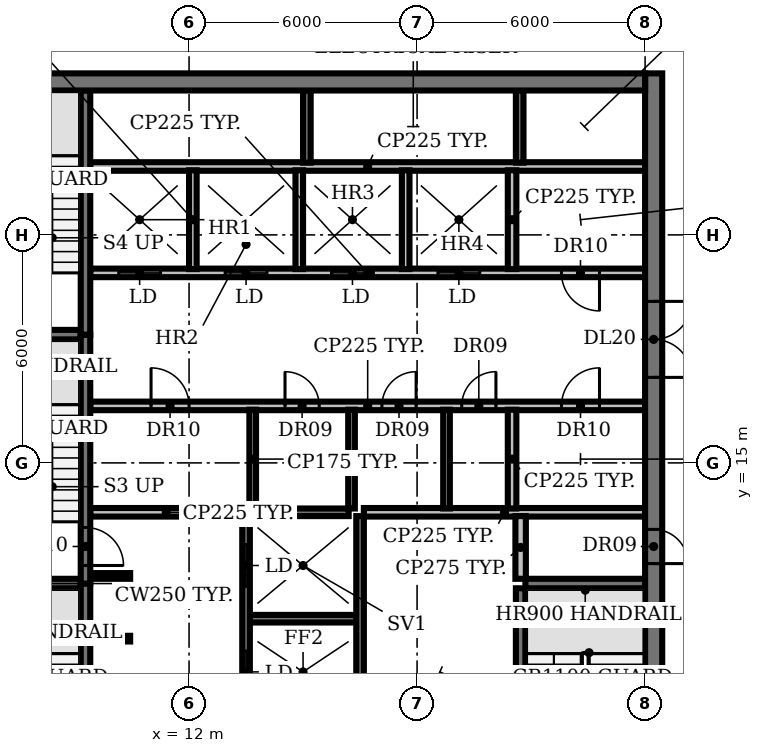
"""IFC4 building model, lengths in metres.
Left out: names, types, materials, properties, quantities, classifications, styles, units other than length and angle.
Written with IfcOpenShell. Run it as: python <this file> out.ifc"""

import sys

from ifc_helpers import new_model, si_unit, direction, frame, frame_2d, origin, place, context, subcontext, project, spatial, rectangle, extrude, element, fill, save


model = new_model("IFC4")
c1 = context("Model", 3, precision=1e-05, world=origin(), true_north=direction((0.0, 1.0)))
c2 = subcontext(c1, "Body", "Model", "MODEL_VIEW")
j1 = project(units=[si_unit("LENGTHUNIT", "METRE"), si_unit("PLANEANGLEUNIT", "RADIAN")], contexts=[c1])
p1 = place(None, origin())
s1 = spatial("IfcSite", under=j1, at=p1, CompositionType="ELEMENT")
p2 = place(p1, origin())
s2 = spatial("IfcBuilding", under=s1, at=p2, CompositionType="ELEMENT")
p3 = place(p2, frame((0.0, 0.0, 234.8)))
s3 = spatial("IfcBuildingStorey", under=s2, at=p3, CompositionType="ELEMENT", Elevation=234.8)
p4 = place(p3, frame((9.4, 10.375, 0.0), z_axis=(0.0, 0.0, 1.0), x_axis=(1.0, 0.0, 0.0)))
e1 = element("IfcWall", 1, at=p4, inside=s3, PredefinedType="SHEAR", context=c2, shape_type="SweptSolid", body=[
    extrude(rectangle(XDim=1.05, YDim=0.15, at=frame_2d((0.525, 0.0))), origin(), (0.0, 0.0, 1.0), 3.85),
])
p5 = place(p3, frame((13.6, 10.9, 0.0), z_axis=(0.0, 0.0, 1.0), x_axis=(1.0, 0.0, 0.0)))
e2 = element("IfcWall", 2, at=p5, inside=s3, PredefinedType="SHEAR", context=c2, shape_type="SweptSolid", body=[
    extrude(rectangle(XDim=2.8, YDim=0.2, at=frame_2d((1.4, 0.0))), origin(), (0.0, 0.0, 1.0), 3.85),
])
for number, where, z_axis, x_axis in (
    (3, (6.0, 11.825, 0.0), (0.0, 0.0, 1.0), (1.0, 0.0, 0.0)),
    (4, (20.85, 11.825, 0.0), (0.0, 0.0, 1.0), (1.0, 0.0, 0.0)),
):
    element("IfcWall", number, at=place(p3, frame(where, z_axis=z_axis, x_axis=x_axis)), inside=s3, PredefinedType="SHEAR", context=c2, shape_type="SweptSolid", body=[
        extrude(rectangle(XDim=3.15, YDim=0.25, at=frame_2d((1.575, 0.0))), origin(), (0.0, 0.0, 1.0), 3.85),
    ])
p6 = place(p3, frame((9.4, 12.025, 0.0), z_axis=(0.0, 0.0, 1.0), x_axis=(1.0, 0.0, 0.0)))
e5 = element("IfcWall", 5, at=p6, inside=s3, PredefinedType="SHEAR", context=c2, shape_type="SweptSolid", body=[
    extrude(rectangle(XDim=1.05, YDim=0.15, at=frame_2d((0.525, 0.0))), origin(), (0.0, 0.0, 1.0), 3.85),
])
p7 = place(p3, frame((9.4, 13.7, 0.0), z_axis=(0.0, 0.0, 1.0), x_axis=(1.0, 0.0, 0.0)))
e6 = element("IfcWall", 6, at=p7, inside=s3, PredefinedType="PARTITIONING", context=c2, shape_type="SweptSolid", body=[
    extrude(rectangle(XDim=4.0, YDim=0.225, at=frame_2d((2.0, 0.0))), origin(), (0.0, 0.0, 1.0), 3.85),
])
p8 = place(p3, frame((13.75, 13.7, 0.0), z_axis=(0.0, 0.0, 1.0), x_axis=(1.0, 0.0, 0.0)))
e7 = element("IfcWall", 7, at=p8, inside=s3, PredefinedType="SHEAR", context=c2, shape_type="SweptSolid", body=[
    extrude(rectangle(XDim=2.45, YDim=0.2, at=frame_2d((1.225, 0.0))), origin(), (0.0, 0.0, 1.0), 3.85),
])
p9 = place(p3, frame((16.6, 13.7, 0.0), z_axis=(0.0, 0.0, 1.0), x_axis=(1.0, 0.0, 0.0)))
e8 = element("IfcWall", 8, at=p9, inside=s3, PredefinedType="PARTITIONING", context=c2, shape_type="SweptSolid", body=[
    extrude(rectangle(XDim=7.4, YDim=0.225, at=frame_2d((3.7, 0.0))), origin(), (0.0, 0.0, 1.0), 3.85),
])
p10 = place(p3, frame((9.4, 16.5, 0.0), z_axis=(0.0, 0.0, 1.0), x_axis=(1.0, 0.0, 0.0)))
e9 = element("IfcWall", 9, at=p10, inside=s3, PredefinedType="PARTITIONING", context=c2, shape_type="SweptSolid", body=[
    extrude(rectangle(XDim=14.6, YDim=0.225, at=frame_2d((7.3, 0.0))), origin(), (0.0, 0.0, 1.0), 3.85),
])
p11 = place(p10, frame((1.6, 0.0, 0.0)))
e10 = element("IfcOpeningElement", 10, at=p11, cuts=e9, PredefinedType="OPENING", context=c2, shape_type="SweptSolid", body=[
    extrude(rectangle(XDim=1.0, YDim=2.1, at=frame_2d((0.5, 1.05))), frame((0.0, 0.123, 0.0), z_axis=(0.0, -1.0, 0.0), x_axis=(1.0, 0.0, 0.0)), (0.0, 0.0, 1.0), 0.245),
])
p12 = place(p10, frame((5.125, 0.0, 0.0)))
e11 = element("IfcOpeningElement", 11, at=p12, cuts=e9, PredefinedType="OPENING", context=c2, shape_type="SweptSolid", body=[
    extrude(rectangle(XDim=0.9, YDim=2.1, at=frame_2d((0.45, 1.05))), frame((0.0, 0.123, 0.0), z_axis=(0.0, -1.0, 0.0), x_axis=(1.0, 0.0, 0.0)), (0.0, 0.0, 1.0), 0.245),
])
p13 = place(p10, frame((7.675, 0.0, 0.0)))
e12 = element("IfcOpeningElement", 12, at=p13, cuts=e9, PredefinedType="OPENING", context=c2, shape_type="SweptSolid", body=[
    extrude(rectangle(XDim=0.9, YDim=2.1, at=frame_2d((0.45, 1.05))), frame((0.0, 0.123, 0.0), z_axis=(0.0, -1.0, 0.0), x_axis=(1.0, 0.0, 0.0)), (0.0, 0.0, 1.0), 0.245),
])
p14 = place(p10, frame((9.775, 0.0, 0.0)))
e13 = element("IfcOpeningElement", 13, at=p14, cuts=e9, PredefinedType="OPENING", context=c2, shape_type="SweptSolid", body=[
    extrude(rectangle(XDim=0.9, YDim=2.1, at=frame_2d((0.45, 1.05))), frame((0.0, 0.123, 0.0), z_axis=(0.0, -1.0, 0.0), x_axis=(1.0, 0.0, 0.0)), (0.0, 0.0, 1.0), 0.245),
])
p15 = place(p10, frame((12.4, 0.0, 0.0)))
e14 = element("IfcOpeningElement", 14, at=p15, cuts=e9, PredefinedType="OPENING", context=c2, shape_type="SweptSolid", body=[
    extrude(rectangle(XDim=1.0, YDim=2.1, at=frame_2d((0.5, 1.05))), frame((0.0, 0.123, 0.0), z_axis=(0.0, -1.0, 0.0), x_axis=(1.0, 0.0, 0.0)), (0.0, 0.0, 1.0), 0.245),
])
p16 = place(p3, frame((6.0, 18.375, 0.0), z_axis=(0.0, 0.0, 1.0), x_axis=(1.0, 0.0, 0.0)))
e15 = element("IfcWall", 15, at=p16, inside=s3, PredefinedType="SHEAR", context=c2, shape_type="SweptSolid", body=[
    extrude(rectangle(XDim=3.15, YDim=0.25, at=frame_2d((1.575, 0.0))), origin(), (0.0, 0.0, 1.0), 3.85),
])
p17 = place(p3, frame((24.0, 20.0, 0.0), z_axis=(0.0, 0.0, 1.0), x_axis=(-1.0, 0.0, 0.0)))
e16 = element("IfcWall", 16, at=p17, inside=s3, PredefinedType="PARTITIONING", context=c2, shape_type="SweptSolid", body=[
    extrude(rectangle(XDim=14.6, YDim=0.225, at=frame_2d((7.3, 0.0))), origin(), (0.0, 0.0, 1.0), 3.85),
])
p18 = place(p17, frame((12.75, 0.0, 0.0)))
e17 = element("IfcOpeningElement", 17, at=p18, cuts=e16, PredefinedType="OPENING", context=c2, shape_type="SweptSolid", body=[
    extrude(rectangle(XDim=1.1, YDim=2.1, at=frame_2d((0.55, 1.05))), frame((0.0, 0.123, 0.0), z_axis=(0.0, -1.0, 0.0), x_axis=(1.0, 0.0, 0.0)), (0.0, 0.0, 1.0), 0.245),
])
p19 = place(p17, frame((9.95, 0.0, 0.0)))
e18 = element("IfcOpeningElement", 18, at=p19, cuts=e16, PredefinedType="OPENING", context=c2, shape_type="SweptSolid", body=[
    extrude(rectangle(XDim=1.1, YDim=2.1, at=frame_2d((0.55, 1.05))), frame((0.0, 0.123, 0.0), z_axis=(0.0, -1.0, 0.0), x_axis=(1.0, 0.0, 0.0)), (0.0, 0.0, 1.0), 0.245),
])
p20 = place(p17, frame((7.15, 0.0, 0.0)))
e19 = element("IfcOpeningElement", 19, at=p20, cuts=e16, PredefinedType="OPENING", context=c2, shape_type="SweptSolid", body=[
    extrude(rectangle(XDim=1.1, YDim=2.1, at=frame_2d((0.55, 1.05))), frame((0.0, 0.123, 0.0), z_axis=(0.0, -1.0, 0.0), x_axis=(1.0, 0.0, 0.0)), (0.0, 0.0, 1.0), 0.245),
])
p21 = place(p17, frame((4.35, 0.0, 0.0)))
e20 = element("IfcOpeningElement", 20, at=p21, cuts=e16, PredefinedType="OPENING", context=c2, shape_type="SweptSolid", body=[
    extrude(rectangle(XDim=1.1, YDim=2.1, at=frame_2d((0.55, 1.05))), frame((0.0, 0.123, 0.0), z_axis=(0.0, -1.0, 0.0), x_axis=(1.0, 0.0, 0.0)), (0.0, 0.0, 1.0), 0.245),
])
p22 = place(p17, frame((1.2, 0.0, 0.0)))
e21 = element("IfcOpeningElement", 21, at=p22, cuts=e16, PredefinedType="OPENING", context=c2, shape_type="SweptSolid", body=[
    extrude(rectangle(XDim=1.0, YDim=2.1, at=frame_2d((0.5, 1.05))), frame((0.0, 0.123, 0.0), z_axis=(0.0, -1.0, 0.0), x_axis=(1.0, 0.0, 0.0)), (0.0, 0.0, 1.0), 0.245),
])
p23 = place(p3, frame((9.4, 22.8, 0.0), z_axis=(0.0, 0.0, 1.0), x_axis=(1.0, 0.0, 0.0)))
e22 = element("IfcWall", 22, at=p23, inside=s3, PredefinedType="PARTITIONING", context=c2, shape_type="SweptSolid", body=[
    extrude(rectangle(XDim=14.6, YDim=0.225, at=frame_2d((7.3, 0.0))), origin(), (0.0, 0.0, 1.0), 3.85),
])
p24 = place(p3, frame((9.275, 11.825, 0.0), z_axis=(0.0, 0.0, 1.0), x_axis=(0.0, -1.0, 0.0)))
e23 = element("IfcWall", 23, at=p24, inside=s3, PredefinedType="SHEAR", context=c2, shape_type="SweptSolid", body=[
    extrude(rectangle(XDim=6.425, YDim=0.25, at=frame_2d((3.212, 0.0))), origin(), (0.0, 0.0, 1.0), 3.85),
])
p25 = place(p24, frame((5.075, 0.0, 0.0)))
e24 = element("IfcOpeningElement", 24, at=p25, cuts=e23, PredefinedType="OPENING", context=c2, shape_type="SweptSolid", body=[
    extrude(rectangle(XDim=1.0, YDim=2.1, at=frame_2d((0.5, 1.05))), frame((0.0, 0.135, 0.0), z_axis=(0.0, -1.0, 0.0), x_axis=(1.0, 0.0, 0.0)), (0.0, 0.0, 1.0), 0.27),
])
p26 = place(p3, frame((9.275, 18.375, 0.0), z_axis=(0.0, 0.0, 1.0), x_axis=(0.0, -1.0, 0.0)))
e25 = element("IfcWall", 25, at=p26, inside=s3, PredefinedType="SHEAR", context=c2, shape_type="SweptSolid", body=[
    extrude(rectangle(XDim=6.55, YDim=0.25, at=frame_2d((3.275, 0.0))), origin(), (0.0, 0.0, 1.0), 3.85),
])
p27 = place(p26, frame((5.075, 0.0, 0.0)))
e26 = element("IfcOpeningElement", 26, at=p27, cuts=e25, PredefinedType="OPENING", context=c2, shape_type="SweptSolid", body=[
    extrude(rectangle(XDim=1.0, YDim=2.1, at=frame_2d((0.5, 1.05))), frame((0.0, 0.135, 0.0), z_axis=(0.0, -1.0, 0.0), x_axis=(1.0, 0.0, 0.0)), (0.0, 0.0, 1.0), 0.27),
])
p28 = place(p3, frame((9.275, 18.375, 0.0), z_axis=(0.0, 0.0, 1.0), x_axis=(0.0, 1.0, 0.0)))
e27 = element("IfcWall", 27, at=p28, inside=s3, PredefinedType="SHEAR", context=c2, shape_type="SweptSolid", body=[
    extrude(rectangle(XDim=6.425, YDim=0.25, at=frame_2d((3.212, 0.0))), origin(), (0.0, 0.0, 1.0), 3.85),
])
p29 = place(p3, frame((12.1, 20.1, 0.0), z_axis=(0.0, 0.0, 1.0), x_axis=(0.0, 1.0, 0.0)))
e28 = element("IfcWall", 28, at=p29, inside=s3, PredefinedType="SOLIDWALL", context=c2, shape_type="SweptSolid", body=[
    extrude(rectangle(XDim=2.6, YDim=0.2, at=frame_2d((1.3, 0.0))), origin(), (0.0, 0.0, 1.0), 3.85),
])
p30 = place(p3, frame((13.5, 5.4, 0.0), z_axis=(0.0, 0.0, 1.0), x_axis=(0.0, 1.0, 0.0)))
e29 = element("IfcWall", 29, at=p30, inside=s3, PredefinedType="SHEAR", context=c2, shape_type="SweptSolid", body=[
    extrude(rectangle(XDim=8.2, YDim=0.2, at=frame_2d((4.1, 0.0))), origin(), (0.0, 0.0, 1.0), 3.85),
])
p31 = place(p30, frame((0.75, 0.0, 0.0)))
e30 = element("IfcOpeningElement", 30, at=p31, cuts=e29, PredefinedType="OPENING", context=c2, shape_type="SweptSolid", body=[
    extrude(rectangle(XDim=1.1, YDim=2.1, at=frame_2d((0.55, 1.05))), frame((0.0, 0.11, 0.0), z_axis=(0.0, -1.0, 0.0), x_axis=(1.0, 0.0, 0.0)), (0.0, 0.0, 1.0), 0.22),
])
p32 = place(p30, frame((3.55, 0.0, 0.0)))
e31 = element("IfcOpeningElement", 31, at=p32, cuts=e29, PredefinedType="OPENING", context=c2, shape_type="SweptSolid", body=[
    extrude(rectangle(XDim=1.1, YDim=2.1, at=frame_2d((0.55, 1.05))), frame((0.0, 0.11, 0.0), z_axis=(0.0, -1.0, 0.0), x_axis=(1.0, 0.0, 0.0)), (0.0, 0.0, 1.0), 0.22),
])
p33 = place(p30, frame((6.35, 0.0, 0.0)))
e32 = element("IfcOpeningElement", 32, at=p33, cuts=e29, PredefinedType="OPENING", context=c2, shape_type="SweptSolid", body=[
    extrude(rectangle(XDim=1.1, YDim=2.1, at=frame_2d((0.55, 1.05))), frame((0.0, 0.11, 0.0), z_axis=(0.0, -1.0, 0.0), x_axis=(1.0, 0.0, 0.0)), (0.0, 0.0, 1.0), 0.22),
])
p34 = place(p3, frame((13.675, 13.8, 0.0), z_axis=(0.0, 0.0, 1.0), x_axis=(0.0, 1.0, 0.0)))
e33 = element("IfcWall", 33, at=p34, inside=s3, PredefinedType="PARTITIONING", context=c2, shape_type="SweptSolid", body=[
    extrude(rectangle(XDim=2.6, YDim=0.175, at=frame_2d((1.3, 0.0))), origin(), (0.0, 0.0, 1.0), 3.85),
])
p35 = place(p3, frame((14.9, 20.1, 0.0), z_axis=(0.0, 0.0, 1.0), x_axis=(0.0, 1.0, 0.0)))
e34 = element("IfcWall", 34, at=p35, inside=s3, PredefinedType="SOLIDWALL", context=c2, shape_type="SweptSolid", body=[
    extrude(rectangle(XDim=2.6, YDim=0.2, at=frame_2d((1.3, 0.0))), origin(), (0.0, 0.0, 1.0), 3.85),
])
p36 = place(p3, frame((15.1, 22.9, 0.0), z_axis=(0.0, 0.0, 1.0), x_axis=(0.0, 1.0, 0.0)))
e35 = element("IfcWall", 35, at=p36, inside=s3, PredefinedType="SHEAR", context=c2, shape_type="SweptSolid", body=[
    extrude(rectangle(XDim=1.9, YDim=0.2, at=frame_2d((0.95, 0.0))), origin(), (0.0, 0.0, 1.0), 3.85),
])
p37 = place(p3, frame((16.275, 13.8, 0.0), z_axis=(0.0, 0.0, 1.0), x_axis=(0.0, 1.0, 0.0)))
e36 = element("IfcWall", 36, at=p37, inside=s3, PredefinedType="PARTITIONING", context=c2, shape_type="SweptSolid", body=[
    extrude(rectangle(XDim=2.6, YDim=0.175, at=frame_2d((1.3, 0.0))), origin(), (0.0, 0.0, 1.0), 3.85),
])
p38 = place(p3, frame((16.5, 5.4, 0.0), z_axis=(0.0, 0.0, 1.0), x_axis=(0.0, 1.0, 0.0)))
e37 = element("IfcWall", 37, at=p38, inside=s3, PredefinedType="SHEAR", context=c2, shape_type="SweptSolid", body=[
    extrude(rectangle(XDim=8.2, YDim=0.2, at=frame_2d((4.1, 0.0))), origin(), (0.0, 0.0, 1.0), 3.85),
])
p39 = place(p3, frame((17.7, 20.1, 0.0), z_axis=(0.0, 0.0, 1.0), x_axis=(0.0, 1.0, 0.0)))
e38 = element("IfcWall", 38, at=p39, inside=s3, PredefinedType="SOLIDWALL", context=c2, shape_type="SweptSolid", body=[
    extrude(rectangle(XDim=2.6, YDim=0.2, at=frame_2d((1.3, 0.0))), origin(), (0.0, 0.0, 1.0), 3.85),
])
p40 = place(p3, frame((18.775, 13.8, 0.0), z_axis=(0.0, 0.0, 1.0), x_axis=(0.0, 1.0, 0.0)))
e39 = element("IfcWall", 39, at=p40, inside=s3, PredefinedType="PARTITIONING", context=c2, shape_type="SweptSolid", body=[
    extrude(rectangle(XDim=2.6, YDim=0.175, at=frame_2d((1.3, 0.0))), origin(), (0.0, 0.0, 1.0), 3.85),
])
for number, where, z_axis, x_axis in (
    (40, (20.5, 13.8, 0.0), (0.0, 0.0, 1.0), (0.0, 1.0, 0.0)),
    (41, (20.5, 20.1, 0.0), (0.0, 0.0, 1.0), (0.0, 1.0, 0.0)),
):
    element("IfcWall", number, at=place(p3, frame(where, z_axis=z_axis, x_axis=x_axis)), inside=s3, PredefinedType="PARTITIONING", context=c2, shape_type="SweptSolid", body=[
        extrude(rectangle(XDim=2.6, YDim=0.225, at=frame_2d((1.3, 0.0))), origin(), (0.0, 0.0, 1.0), 3.85),
    ])
p41 = place(p3, frame((20.7, 22.9, 0.0), z_axis=(0.0, 0.0, 1.0), x_axis=(0.0, 1.0, 0.0)))
e42 = element("IfcWall", 42, at=p41, inside=s3, PredefinedType="SHEAR", context=c2, shape_type="SweptSolid", body=[
    extrude(rectangle(XDim=1.9, YDim=0.2, at=frame_2d((0.95, 0.0))), origin(), (0.0, 0.0, 1.0), 3.85),
])
p42 = place(p3, frame((20.725, 5.4, 0.0), z_axis=(0.0, 0.0, 1.0), x_axis=(0.0, 1.0, 0.0)))
e43 = element("IfcWall", 43, at=p42, inside=s3, PredefinedType="SHEAR", context=c2, shape_type="SweptSolid", body=[
    extrude(rectangle(XDim=6.3, YDim=0.25, at=frame_2d((3.15, 0.0))), origin(), (0.0, 0.0, 1.0), 3.85),
])
p43 = place(p3, frame((20.725, 11.95, 0.0), z_axis=(0.0, 0.0, 1.0), x_axis=(0.0, 1.0, 0.0)))
e44 = element("IfcWall", 44, at=p43, inside=s3, PredefinedType="PARTITIONING", context=c2, shape_type="SweptSolid", body=[
    extrude(rectangle(XDim=1.65, YDim=0.275, at=frame_2d((0.825, 0.0))), origin(), (0.0, 0.0, 1.0), 3.85),
])
p44 = place(p3, frame((24.225, 25.25, 0.0), z_axis=(0.0, 0.0, 1.0), x_axis=(0.0, -1.0, 0.0)))
e45 = element("IfcWall", 45, at=p44, inside=s3, PredefinedType="SHEAR", context=c2, shape_type="SweptSolid", body=[
    extrude(rectangle(XDim=20.83, YDim=0.45, at=frame_2d((10.415, 0.0))), origin(), (0.0, 0.0, 1.0), 3.85),
])
p45 = place(p44, frame((18.1, 0.0, 0.0)))
e46 = element("IfcOpeningElement", 46, at=p45, cuts=e45, PredefinedType="OPENING", context=c2, shape_type="SweptSolid", body=[
    extrude(rectangle(XDim=1.5, YDim=2.1, at=frame_2d((0.75, 1.05))), frame((0.0, 0.235, 0.0), z_axis=(0.0, -1.0, 0.0), x_axis=(1.0, 0.0, 0.0)), (0.0, 0.0, 1.0), 0.47),
])
p46 = place(p44, frame((12.0, 0.0, 0.0)))
e47 = element("IfcOpeningElement", 47, at=p46, cuts=e45, PredefinedType="OPENING", context=c2, shape_type="SweptSolid", body=[
    extrude(rectangle(XDim=0.9, YDim=2.1, at=frame_2d((0.45, 1.05))), frame((0.0, 0.235, 0.0), z_axis=(0.0, -1.0, 0.0), x_axis=(1.0, 0.0, 0.0)), (0.0, 0.0, 1.0), 0.47),
])
p47 = place(p44, frame((6.0, 0.0, 0.0)))
e48 = element("IfcOpeningElement", 48, at=p47, cuts=e45, PredefinedType="OPENING", context=c2, shape_type="SweptSolid", body=[
    extrude(rectangle(XDim=2.0, YDim=2.1, at=frame_2d((1.0, 1.05))), frame((0.0, 0.235, 0.0), z_axis=(0.0, -1.0, 0.0), x_axis=(1.0, 0.0, 0.0)), (0.0, 0.0, 1.0), 0.47),
])
p48 = place(p3, frame((6.0, 25.025, 0.0), z_axis=(0.0, 0.0, 1.0), x_axis=(1.0, 0.0, 0.0)))
e49 = element("IfcWall", 49, at=p48, inside=s3, PredefinedType="SHEAR", context=c2, shape_type="SweptSolid", body=[
    extrude(rectangle(XDim=18.0, YDim=0.45, at=frame_2d((9.0, 0.0))), origin(), (0.0, 0.0, 1.0), 3.85),
])
p49 = place(p11, origin())
e50 = element("IfcDoor", 50, at=p49, inside=s3, OperationType="SINGLE_SWING_LEFT", PredefinedType="DOOR", context=c2, shape_type="SweptSolid", body=[
    extrude(rectangle(XDim=1.0, YDim=2.1, at=frame_2d((0.5, 1.05))), frame((0.0, 0.025, 0.0), z_axis=(0.0, -1.0, 0.0), x_axis=(1.0, 0.0, 0.0)), (0.0, 0.0, 1.0), 0.05),
])
fill(e10, e50)
p50 = place(p12, origin())
e51 = element("IfcDoor", 51, at=p50, inside=s3, OperationType="SINGLE_SWING_LEFT", PredefinedType="DOOR", context=c2, shape_type="SweptSolid", body=[
    extrude(rectangle(XDim=0.9, YDim=2.1, at=frame_2d((0.45, 1.05))), frame((0.0, 0.025, 0.0), z_axis=(0.0, -1.0, 0.0), x_axis=(1.0, 0.0, 0.0)), (0.0, 0.0, 1.0), 0.05),
])
fill(e11, e51)
p51 = place(p13, origin())
e52 = element("IfcDoor", 52, at=p51, inside=s3, OperationType="SINGLE_SWING_RIGHT", PredefinedType="DOOR", context=c2, shape_type="SweptSolid", body=[
    extrude(rectangle(XDim=0.9, YDim=2.1, at=frame_2d((0.45, 1.05))), frame((0.0, 0.025, 0.0), z_axis=(0.0, -1.0, 0.0), x_axis=(1.0, 0.0, 0.0)), (0.0, 0.0, 1.0), 0.05),
])
fill(e12, e52)
p52 = place(p14, origin())
e53 = element("IfcDoor", 53, at=p52, inside=s3, OperationType="SINGLE_SWING_RIGHT", PredefinedType="DOOR", context=c2, shape_type="SweptSolid", body=[
    extrude(rectangle(XDim=0.9, YDim=2.1, at=frame_2d((0.45, 1.05))), frame((0.0, 0.025, 0.0), z_axis=(0.0, -1.0, 0.0), x_axis=(1.0, 0.0, 0.0)), (0.0, 0.0, 1.0), 0.05),
])
fill(e13, e53)
p53 = place(p15, origin())
e54 = element("IfcDoor", 54, at=p53, inside=s3, OperationType="SINGLE_SWING_RIGHT", PredefinedType="DOOR", context=c2, shape_type="SweptSolid", body=[
    extrude(rectangle(XDim=1.0, YDim=2.1, at=frame_2d((0.5, 1.05))), frame((0.0, 0.025, 0.0), z_axis=(0.0, -1.0, 0.0), x_axis=(1.0, 0.0, 0.0)), (0.0, 0.0, 1.0), 0.05),
])
fill(e14, e54)
p54 = place(p18, origin())
e55 = element("IfcDoor", 55, at=p54, inside=s3, OperationType="DOUBLE_DOOR_SLIDING", PredefinedType="DOOR", context=c2, shape_type="SweptSolid", body=[
    extrude(rectangle(XDim=1.1, YDim=2.1, at=frame_2d((0.55, 1.05))), frame((0.0, 0.025, 0.0), z_axis=(0.0, -1.0, 0.0), x_axis=(1.0, 0.0, 0.0)), (0.0, 0.0, 1.0), 0.05),
])
fill(e17, e55)
p55 = place(p19, origin())
e56 = element("IfcDoor", 56, at=p55, inside=s3, OperationType="DOUBLE_DOOR_SLIDING", PredefinedType="DOOR", context=c2, shape_type="SweptSolid", body=[
    extrude(rectangle(XDim=1.1, YDim=2.1, at=frame_2d((0.55, 1.05))), frame((0.0, 0.025, 0.0), z_axis=(0.0, -1.0, 0.0), x_axis=(1.0, 0.0, 0.0)), (0.0, 0.0, 1.0), 0.05),
])
fill(e18, e56)
p56 = place(p20, origin())
e57 = element("IfcDoor", 57, at=p56, inside=s3, OperationType="DOUBLE_DOOR_SLIDING", PredefinedType="DOOR", context=c2, shape_type="SweptSolid", body=[
    extrude(rectangle(XDim=1.1, YDim=2.1, at=frame_2d((0.55, 1.05))), frame((0.0, 0.025, 0.0), z_axis=(0.0, -1.0, 0.0), x_axis=(1.0, 0.0, 0.0)), (0.0, 0.0, 1.0), 0.05),
])
fill(e19, e57)
p57 = place(p21, origin())
e58 = element("IfcDoor", 58, at=p57, inside=s3, OperationType="DOUBLE_DOOR_SLIDING", PredefinedType="DOOR", context=c2, shape_type="SweptSolid", body=[
    extrude(rectangle(XDim=1.1, YDim=2.1, at=frame_2d((0.55, 1.05))), frame((0.0, 0.025, 0.0), z_axis=(0.0, -1.0, 0.0), x_axis=(1.0, 0.0, 0.0)), (0.0, 0.0, 1.0), 0.05),
])
fill(e20, e58)
p58 = place(p22, origin())
e59 = element("IfcDoor", 59, at=p58, inside=s3, OperationType="SINGLE_SWING_LEFT", PredefinedType="DOOR", context=c2, shape_type="SweptSolid", body=[
    extrude(rectangle(XDim=1.0, YDim=2.1, at=frame_2d((0.5, 1.05))), frame((0.0, 0.025, 0.0), z_axis=(0.0, -1.0, 0.0), x_axis=(1.0, 0.0, 0.0)), (0.0, 0.0, 1.0), 0.05),
])
fill(e21, e59)
p59 = place(p27, origin())
e60 = element("IfcDoor", 60, at=p59, inside=s3, OperationType="SINGLE_SWING_RIGHT", PredefinedType="DOOR", context=c2, shape_type="SweptSolid", body=[
    extrude(rectangle(XDim=1.0, YDim=2.1, at=frame_2d((0.5, 1.05))), frame((0.0, 0.025, 0.0), z_axis=(0.0, -1.0, 0.0), x_axis=(1.0, 0.0, 0.0)), (0.0, 0.0, 1.0), 0.05),
])
fill(e26, e60)
p60 = place(p32, origin())
e61 = element("IfcDoor", 61, at=p60, inside=s3, OperationType="DOUBLE_DOOR_SLIDING", PredefinedType="DOOR", context=c2, shape_type="SweptSolid", body=[
    extrude(rectangle(XDim=1.1, YDim=2.1, at=frame_2d((0.55, 1.05))), frame((0.0, 0.025, 0.0), z_axis=(0.0, -1.0, 0.0), x_axis=(1.0, 0.0, 0.0)), (0.0, 0.0, 1.0), 0.05),
])
fill(e31, e61)
p61 = place(p33, origin())
e62 = element("IfcDoor", 62, at=p61, inside=s3, OperationType="DOUBLE_DOOR_SLIDING", PredefinedType="DOOR", context=c2, shape_type="SweptSolid", body=[
    extrude(rectangle(XDim=1.1, YDim=2.1, at=frame_2d((0.55, 1.05))), frame((0.0, 0.025, 0.0), z_axis=(0.0, -1.0, 0.0), x_axis=(1.0, 0.0, 0.0)), (0.0, 0.0, 1.0), 0.05),
])
fill(e32, e62)
p62 = place(p46, origin())
e63 = element("IfcDoor", 63, at=p62, inside=s3, OperationType="SINGLE_SWING_RIGHT", PredefinedType="DOOR", context=c2, shape_type="SweptSolid", body=[
    extrude(rectangle(XDim=0.9, YDim=2.1, at=frame_2d((0.45, 1.05))), frame((0.0, 0.025, 0.0), z_axis=(0.0, -1.0, 0.0), x_axis=(1.0, 0.0, 0.0)), (0.0, 0.0, 1.0), 0.05),
])
fill(e47, e63)
p63 = place(p47, origin())
e64 = element("IfcDoor", 64, at=p63, inside=s3, OperationType="DOUBLE_DOOR_SINGLE_SWING", PredefinedType="DOOR", context=c2, shape_type="SweptSolid", body=[
    extrude(rectangle(XDim=2.0, YDim=2.1, at=frame_2d((1.0, 1.05))), frame((0.0, 0.025, 0.0), z_axis=(0.0, -1.0, 0.0), x_axis=(1.0, 0.0, 0.0)), (0.0, 0.0, 1.0), 0.05),
])
fill(e48, e64)
save(model, sys.argv[1])
